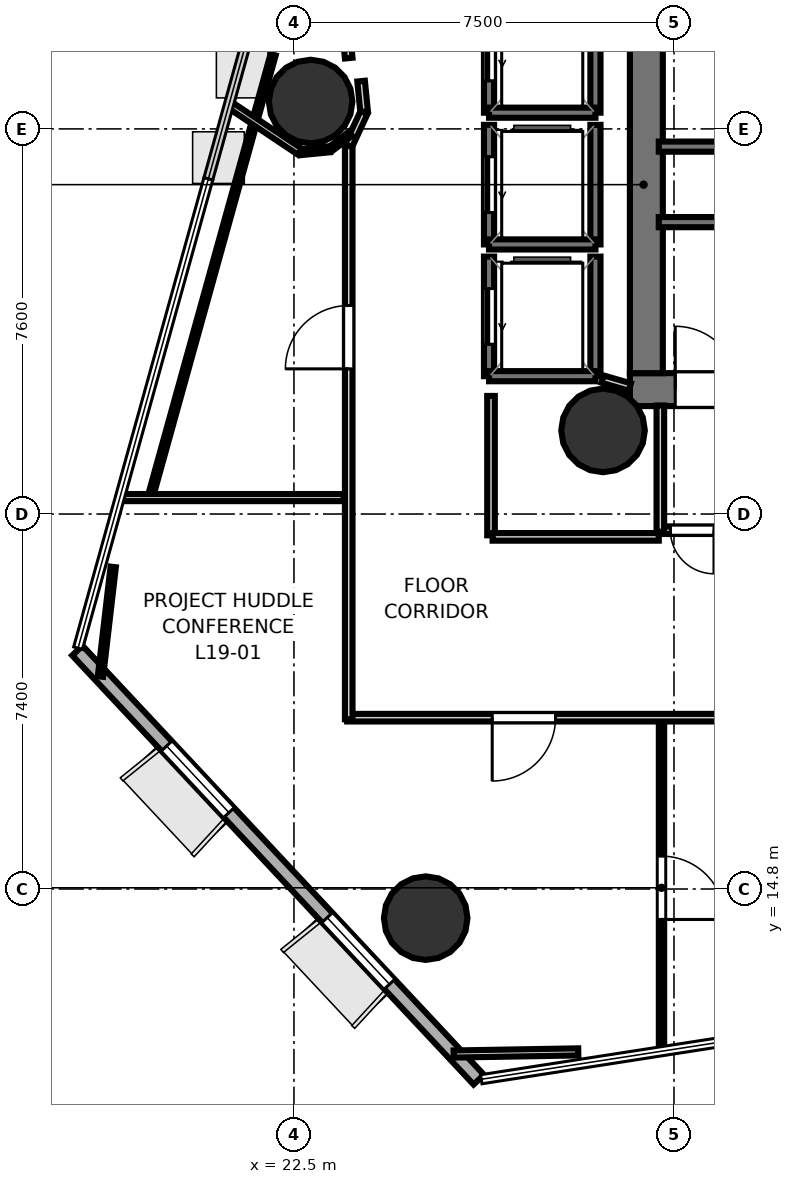
"""IFC4 building model, lengths in metres.
Left out: names, types, materials, properties, quantities, classifications, styles, units other than length and angle.
Written with IfcOpenShell. Run it as: python <this file> out.ifc"""

import sys

from ifc_helpers import new_model, si_unit, direction, frame, frame_2d, origin, origin_2d, place, context, subcontext, project, spatial, rectangle, hollow_circle, extrude, element, fill, save


model = new_model("IFC4")
c1 = context("Model", 3, precision=1e-05, world=origin(), true_north=direction((0.0, 1.0)))
c2 = subcontext(c1, "Body", "Model", "MODEL_VIEW")
j1 = project(units=[si_unit("LENGTHUNIT", "METRE"), si_unit("PLANEANGLEUNIT", "RADIAN")], contexts=[c1])
p1 = place(None, origin())
s1 = spatial("IfcSite", under=j1, at=p1, CompositionType="ELEMENT")
p2 = place(p1, origin())
s2 = spatial("IfcBuilding", under=s1, at=p2, CompositionType="ELEMENT")
p3 = place(p2, frame((0.0, 0.0, 78.4)))
s3 = spatial("IfcBuildingStorey", under=s2, at=p3, CompositionType="ELEMENT", Elevation=78.4)
p4 = place(p3, frame((29.13, 24.655, 0.0), z_axis=(0.0, 0.0, 1.0), x_axis=(1.0, 0.0, 0.0)))
e1 = element("IfcWall", 1, at=p4, inside=s3, PredefinedType="SHEAR", context=c2, shape_type="SweptSolid", body=[
    extrude(rectangle(XDim=10.72, YDim=0.65, at=frame_2d((5.36, 0.0))), origin(), (0.0, 0.0, 1.0), 3.52),
])
p5 = place(p4, frame((0.895, 0.0, 0.0)))
e2 = element("IfcOpeningElement", 2, at=p5, cuts=e1, PredefinedType="OPENING", context=c2, shape_type="SweptSolid", body=[
    extrude(rectangle(XDim=1.25, YDim=2.15, at=frame_2d((0.625, 1.075))), frame((0.0, 0.335, 0.0), z_axis=(0.0, -1.0, 0.0), x_axis=(1.0, 0.0, 0.0)), (0.0, 0.0, 1.0), 0.67),
])
p6 = place(p3, frame((29.455, 24.98, 0.0), z_axis=(0.0, 0.0, 1.0), x_axis=(0.0, 1.0, 0.0)))
e3 = element("IfcWall", 3, at=p6, inside=s3, PredefinedType="SHEAR", context=c2, shape_type="SweptSolid", body=[
    extrude(rectangle(XDim=7.44, YDim=0.65, at=frame_2d((3.72, 0.0))), origin(), (0.0, 0.0, 1.0), 3.52),
])
for number, where, z_axis, x_axis in (
    (4, (28.6, 23.85, 0.0), (0.0, 0.0, 1.0), (1.0, 0.0, 0.0)),
    (5, (22.829, 30.34, 0.0), (0.0, 0.0, 1.0), (1.0, 0.0, 0.0)),
    (6, (25.1, 14.225, 0.0), (0.0, 0.0, 1.0), (1.0, 0.0, 0.0)),
):
    element("IfcColumn", number, at=place(p3, frame(where, z_axis=z_axis, x_axis=x_axis)), inside=s3, PredefinedType="COLUMN", context=c2, shape_type="SweptSolid", body=[
        extrude(hollow_circle(Radius=0.825, WallThickness=0.04, at=origin_2d()), origin(), (0.0, 0.0, 1.0), 3.7),
    ])
p7 = place(p3, frame((18.226, 19.505, 0.0), z_axis=(0.0, 0.0, 1.0), x_axis=(0.683186467085, -0.730243966898, 0.0)))
e7 = element("IfcWall", 7, at=p7, inside=s3, PredefinedType="SOLIDWALL", context=c2, shape_type="SweptSolid", body=[
    extrude(rectangle(XDim=11.595, YDim=0.28, at=frame_2d((5.798, 0.0))), origin(), (0.0, 0.0, 1.0), 3.52),
])
p8 = place(p7, frame((2.579, 0.0, 0.85)))
e8 = element("IfcOpeningElement", 8, at=p8, cuts=e7, PredefinedType="OPENING", context=c2, shape_type="SweptSolid", body=[
    extrude(rectangle(XDim=1.8, YDim=2.1, at=frame_2d((0.9, 1.05))), frame((0.0, 0.15, 0.0), z_axis=(0.0, -1.0, 0.0), x_axis=(1.0, 0.0, 0.0)), (0.0, 0.0, 1.0), 0.3),
])
p9 = place(p7, frame((7.217, 0.0, 0.85)))
e9 = element("IfcOpeningElement", 9, at=p9, cuts=e7, PredefinedType="OPENING", context=c2, shape_type="SweptSolid", body=[
    extrude(rectangle(XDim=1.8, YDim=2.1, at=frame_2d((0.9, 1.05))), frame((0.0, 0.15, 0.0), z_axis=(0.0, -1.0, 0.0), x_axis=(1.0, 0.0, 0.0)), (0.0, 0.0, 1.0), 0.3),
])
p10 = place(p3, frame((29.7, 29.45, 0.0), z_axis=(0.0, 0.0, 1.0), x_axis=(1.0, 0.0, 0.0)))
e10 = element("IfcWall", 10, at=p10, inside=s3, PredefinedType="SOLIDWALL", context=c2, shape_type="SweptSolid", body=[
    extrude(rectangle(XDim=8.3, YDim=0.2, at=frame_2d((4.15, 0.0))), origin(), (0.0, 0.0, 1.0), 3.52),
])
p11 = place(p3, frame((29.7, 27.96, 0.0), z_axis=(0.0, 0.0, 1.0), x_axis=(1.0, 0.0, 0.0)))
e11 = element("IfcWall", 11, at=p11, inside=s3, PredefinedType="SOLIDWALL", context=c2, shape_type="SweptSolid", body=[
    extrude(rectangle(XDim=7.75, YDim=0.2, at=frame_2d((3.875, 0.0))), origin(), (0.0, 0.0, 1.0), 3.52),
])
p12 = place(p3, frame((28.45, 30.12, 0.0), z_axis=(0.0, 0.0, 1.0), x_axis=(0.0, 1.0, 0.0)))
e12 = element("IfcWall", 12, at=p12, inside=s3, PredefinedType="SOLIDWALL", context=c2, shape_type="SweptSolid", body=[
    extrude(rectangle(XDim=2.36, YDim=0.2, at=frame_2d((1.18, 0.0))), origin(), (0.0, 0.0, 1.0), 3.52),
])
p13 = place(p3, frame((26.35, 30.12, 0.0), z_axis=(0.0, 0.0, 1.0), x_axis=(0.0, 1.0, 0.0)))
e13 = element("IfcWall", 13, at=p13, inside=s3, PredefinedType="SOLIDWALL", context=c2, shape_type="SweptSolid", body=[
    extrude(rectangle(XDim=2.36, YDim=0.2, at=frame_2d((1.18, 0.0))), origin(), (0.0, 0.0, 1.0), 3.52),
])
p14 = place(p13, frame((0.63, 0.0, 0.0)))
e14 = element("IfcOpeningElement", 14, at=p14, cuts=e13, PredefinedType="OPENING", context=c2, shape_type="SweptSolid", body=[
    extrude(rectangle(XDim=1.1, YDim=2.15, at=frame_2d((0.55, 1.075))), frame((0.0, 0.11, 0.0), z_axis=(0.0, -1.0, 0.0), x_axis=(1.0, 0.0, 0.0)), (0.0, 0.0, 1.0), 0.22),
])
p15 = place(p3, frame((26.35, 30.12, 0.0), z_axis=(0.0, 0.0, 1.0), x_axis=(1.0, 0.0, 0.0)))
e15 = element("IfcWall", 15, at=p15, inside=s3, PredefinedType="SOLIDWALL", context=c2, shape_type="SweptSolid", body=[
    extrude(rectangle(XDim=2.1, YDim=0.2, at=frame_2d((1.05, 0.0))), origin(), (0.0, 0.0, 1.0), 3.52),
])
p16 = place(p3, frame((28.45, 27.52, 0.0), z_axis=(0.0, 0.0, 1.0), x_axis=(0.0, 1.0, 0.0)))
e16 = element("IfcWall", 16, at=p16, inside=s3, PredefinedType="SOLIDWALL", context=c2, shape_type="SweptSolid", body=[
    extrude(rectangle(XDim=2.36, YDim=0.2, at=frame_2d((1.18, 0.0))), origin(), (0.0, 0.0, 1.0), 3.52),
])
p17 = place(p3, frame((26.35, 27.52, 0.0), z_axis=(0.0, 0.0, 1.0), x_axis=(0.0, 1.0, 0.0)))
e17 = element("IfcWall", 17, at=p17, inside=s3, PredefinedType="SOLIDWALL", context=c2, shape_type="SweptSolid", body=[
    extrude(rectangle(XDim=2.36, YDim=0.2, at=frame_2d((1.18, 0.0))), origin(), (0.0, 0.0, 1.0), 3.52),
])
p18 = place(p17, frame((0.63, 0.0, 0.0)))
e18 = element("IfcOpeningElement", 18, at=p18, cuts=e17, PredefinedType="OPENING", context=c2, shape_type="SweptSolid", body=[
    extrude(rectangle(XDim=1.1, YDim=2.15, at=frame_2d((0.55, 1.075))), frame((0.0, 0.11, 0.0), z_axis=(0.0, -1.0, 0.0), x_axis=(1.0, 0.0, 0.0)), (0.0, 0.0, 1.0), 0.22),
])
p19 = place(p3, frame((26.35, 27.52, 0.0), z_axis=(0.0, 0.0, 1.0), x_axis=(1.0, 0.0, 0.0)))
e19 = element("IfcWall", 19, at=p19, inside=s3, PredefinedType="SOLIDWALL", context=c2, shape_type="SweptSolid", body=[
    extrude(rectangle(XDim=2.1, YDim=0.2, at=frame_2d((1.05, 0.0))), origin(), (0.0, 0.0, 1.0), 3.52),
])
p20 = place(p3, frame((28.45, 24.92, 0.0), z_axis=(0.0, 0.0, 1.0), x_axis=(0.0, 1.0, 0.0)))
e20 = element("IfcWall", 20, at=p20, inside=s3, PredefinedType="SOLIDWALL", context=c2, shape_type="SweptSolid", body=[
    extrude(rectangle(XDim=2.36, YDim=0.2, at=frame_2d((1.18, 0.0))), origin(), (0.0, 0.0, 1.0), 3.52),
])
p21 = place(p3, frame((26.35, 24.92, 0.0), z_axis=(0.0, 0.0, 1.0), x_axis=(0.0, 1.0, 0.0)))
e21 = element("IfcWall", 21, at=p21, inside=s3, PredefinedType="SOLIDWALL", context=c2, shape_type="SweptSolid", body=[
    extrude(rectangle(XDim=2.36, YDim=0.2, at=frame_2d((1.18, 0.0))), origin(), (0.0, 0.0, 1.0), 3.52),
])
p22 = place(p21, frame((0.63, 0.0, 0.0)))
e22 = element("IfcOpeningElement", 22, at=p22, cuts=e21, PredefinedType="OPENING", context=c2, shape_type="SweptSolid", body=[
    extrude(rectangle(XDim=1.1, YDim=2.15, at=frame_2d((0.55, 1.075))), frame((0.0, 0.11, 0.0), z_axis=(0.0, -1.0, 0.0), x_axis=(1.0, 0.0, 0.0)), (0.0, 0.0, 1.0), 0.22),
])
p23 = place(p3, frame((26.35, 24.92, 0.0), z_axis=(0.0, 0.0, 1.0), x_axis=(1.0, 0.0, 0.0)))
e23 = element("IfcWall", 23, at=p23, inside=s3, PredefinedType="SOLIDWALL", context=c2, shape_type="SweptSolid", body=[
    extrude(rectangle(XDim=2.1, YDim=0.2, at=frame_2d((1.05, 0.0))), origin(), (0.0, 0.0, 1.0), 3.52),
])
p24 = place(p3, frame((33.45, 21.881, 0.0), z_axis=(0.0, 0.0, 1.0), x_axis=(-1.0, 0.0, 0.0)))
e24 = element("IfcWall", 24, at=p24, inside=s3, PredefinedType="PARTITIONING", context=c2, shape_type="SweptSolid", body=[
    extrude(rectangle(XDim=3.75, YDim=0.15, at=frame_2d((1.875, 0.0))), origin(), (0.0, 0.0, 1.0), 2.84),
])
p25 = place(p24, frame((1.275, 0.0, 0.0)))
e25 = element("IfcOpeningElement", 25, at=p25, cuts=e24, PredefinedType="OPENING", context=c2, shape_type="SweptSolid", body=[
    extrude(rectangle(XDim=1.2, YDim=2.15, at=frame_2d((0.6, 1.075))), frame((0.0, 0.085, 0.0), z_axis=(0.0, -1.0, 0.0), x_axis=(1.0, 0.0, 0.0)), (0.0, 0.0, 1.0), 0.17),
])
p26 = place(p24, frame((2.66, 0.0, 0.0)))
e26 = element("IfcOpeningElement", 26, at=p26, cuts=e24, PredefinedType="OPENING", context=c2, shape_type="SweptSolid", body=[
    extrude(rectangle(XDim=0.86, YDim=2.05, at=frame_2d((0.43, 1.025))), frame((0.0, 0.085, 0.0), z_axis=(0.0, -1.0, 0.0), x_axis=(1.0, 0.0, 0.0)), (0.0, 0.0, 1.0), 0.17),
])
p27 = place(p3, frame((29.731, 21.85, 0.0), z_axis=(0.0, 0.0, 1.0), x_axis=(0.0, 1.0, 0.0)))
e27 = element("IfcWall", 27, at=p27, inside=s3, PredefinedType="PARTITIONING", context=c2, shape_type="SweptSolid", body=[
    extrude(rectangle(XDim=2.492, YDim=0.15, at=frame_2d((1.246, 0.0))), origin(), (0.0, 0.0, 1.0), 2.84),
])
p28 = place(p3, frame((29.13, 24.706, 0.0), z_axis=(0.0, 0.0, 1.0), x_axis=(-0.960451214223, 0.278448316742, 0.0)))
e28 = element("IfcWall", 28, at=p28, inside=s3, PredefinedType="PARTITIONING", context=c2, shape_type="SweptSolid", body=[
    extrude(rectangle(XDim=0.562, YDim=0.15, at=frame_2d((0.281, 0.0))), origin(), (0.0, 0.0, 1.0), 2.84),
])
p29 = place(p3, frame((23.581, 31.197, 0.0), z_axis=(0.0, 0.0, 1.0), x_axis=(-0.098472401476, 0.995139782215, 0.0)))
e29 = element("IfcWall", 29, at=p29, inside=s3, PredefinedType="PARTITIONING", context=c2, shape_type="SweptSolid", body=[
    extrude(rectangle(XDim=5.625, YDim=0.15, at=frame_2d((2.813, 0.0))), origin(), (0.0, 0.0, 1.0), 2.798),
])
p30 = place(p3, frame((26.389, 24.531, 0.0), z_axis=(0.0, 0.0, 1.0), x_axis=(0.0, -1.0, 0.0)))
e30 = element("IfcWall", 30, at=p30, inside=s3, PredefinedType="PARTITIONING", context=c2, shape_type="SweptSolid", body=[
    extrude(rectangle(XDim=2.75, YDim=0.15, at=frame_2d((1.375, 0.0))), origin(), (0.0, 0.0, 1.0), 2.84),
])
p31 = place(p3, frame((26.42, 21.749, 0.0), z_axis=(0.0, 0.0, 1.0), x_axis=(1.0, 0.0, 0.0)))
e31 = element("IfcWall", 31, at=p31, inside=s3, PredefinedType="PARTITIONING", context=c2, shape_type="SweptSolid", body=[
    extrude(rectangle(XDim=3.28, YDim=0.15, at=frame_2d((1.64, 0.0))), origin(), (0.0, 0.0, 1.0), 2.84),
])
p32 = place(p3, frame((33.32, 18.181, 0.0), z_axis=(0.0, 0.0, 1.0), x_axis=(-1.0, 0.0, 0.0)))
e32 = element("IfcWall", 32, at=p32, inside=s3, PredefinedType="PARTITIONING", context=c2, shape_type="SweptSolid", body=[
    extrude(rectangle(XDim=9.77, YDim=0.15, at=frame_2d((4.885, 0.0))), origin(), (0.0, 0.0, 1.0), 2.798),
])
p33 = place(p32, frame((5.657, 0.0, 0.0)))
e33 = element("IfcOpeningElement", 33, at=p33, cuts=e32, PredefinedType="OPENING", context=c2, shape_type="SweptSolid", body=[
    extrude(rectangle(XDim=1.25, YDim=2.2, at=frame_2d((0.625, 1.1))), frame((0.0, 0.085, 0.0), z_axis=(0.0, -1.0, 0.0), x_axis=(1.0, 0.0, 0.0)), (0.0, 0.0, 1.0), 0.17),
])
p34 = place(p3, frame((23.581, 18.15, 0.0), z_axis=(0.0, 0.0, 1.0), x_axis=(0.0, 1.0, 0.0)))
e34 = element("IfcWall", 34, at=p34, inside=s3, PredefinedType="PARTITIONING", context=c2, shape_type="SweptSolid", body=[
    extrude(rectangle(XDim=11.333, YDim=0.15, at=frame_2d((5.667, 0.0))), origin(), (0.0, 0.0, 1.0), 2.798),
])
p35 = place(p34, frame((6.915, 0.0, 0.0)))
e35 = element("IfcOpeningElement", 35, at=p35, cuts=e34, PredefinedType="OPENING", context=c2, shape_type="SweptSolid", body=[
    extrude(rectangle(XDim=1.25, YDim=2.2, at=frame_2d((0.625, 1.1))), frame((0.0, 0.085, 0.0), z_axis=(0.0, -1.0, 0.0), x_axis=(1.0, 0.0, 0.0)), (0.0, 0.0, 1.0), 0.17),
])
p36 = place(p3, frame((23.578, 29.47, 0.0), z_axis=(0.0, 0.0, 1.0), x_axis=(0.421827918194, 0.906675910914, 0.0)))
e36 = element("IfcWall", 36, at=p36, inside=s3, PredefinedType="PARTITIONING", context=c2, shape_type="SweptSolid", body=[
    extrude(rectangle(XDim=0.72, YDim=0.15, at=frame_2d((0.36, 0.0))), origin(), (0.0, 0.0, 1.0), 2.84),
])
p37 = place(p3, frame((23.885, 30.139, 0.0), z_axis=(0.0, 0.0, 1.0), x_axis=(-0.0981888168, 0.995167803064, 0.0)))
e37 = element("IfcWall", 37, at=p37, inside=s3, PredefinedType="PARTITIONING", context=c2, shape_type="SweptSolid", body=[
    extrude(rectangle(XDim=0.607, YDim=0.15, at=frame_2d((0.303, 0.0))), origin(), (0.0, 0.0, 1.0), 2.84),
])
p38 = place(p3, frame((29.754, 18.07, 0.0), z_axis=(0.0, 0.0, 1.0), x_axis=(0.0, -1.0, 0.0)))
e38 = element("IfcWall", 38, at=p38, inside=s3, PredefinedType="PARTITIONING", context=c2, shape_type="SweptSolid", body=[
    extrude(rectangle(XDim=6.492, YDim=0.105, at=frame_2d((3.246, 0.0))), origin(), (0.0, 0.0, 1.0), 2.798),
])
p39 = place(p38, frame((2.621, 0.0, 0.0)))
e39 = element("IfcOpeningElement", 39, at=p39, cuts=e38, PredefinedType="OPENING", context=c2, shape_type="SweptSolid", body=[
    extrude(rectangle(XDim=1.25, YDim=2.2, at=frame_2d((0.625, 1.1))), frame((0.0, 0.062, 0.0), z_axis=(0.0, -1.0, 0.0), x_axis=(1.0, 0.0, 0.0)), (0.0, 0.0, 1.0), 0.125),
])
p40 = place(p3, frame((28.111, 11.586, 0.0), z_axis=(0.0, 0.0, 1.0), x_axis=(-0.999852578009, -0.017170388723, 0.0)))
e40 = element("IfcWall", 40, at=p40, inside=s3, PredefinedType="PARTITIONING", context=c2, shape_type="SweptSolid", body=[
    extrude(rectangle(XDim=2.46, YDim=0.14, at=frame_2d((1.23, 0.0))), origin(), (0.0, 0.0, 1.0), 2.84),
])
p41 = place(p3, frame((18.681, 18.993, 0.0), z_axis=(0.0, 0.0, 1.0), x_axis=(0.115709243411, 0.993283127305, 0.0)))
e41 = element("IfcWall", 41, at=p41, inside=s3, PredefinedType="PARTITIONING", context=c2, shape_type="SweptSolid", body=[
    extrude(rectangle(XDim=2.177, YDim=0.105, at=frame_2d((1.089, 0.0))), origin(), (0.0, 0.0, 1.0), 2.84),
])
p42 = place(p3, frame((19.044, 22.524, 0.0), z_axis=(0.0, 0.0, 1.0), x_axis=(1.0, 0.0, 0.0)))
e42 = element("IfcWall", 42, at=p42, inside=s3, PredefinedType="PARTITIONING", context=c2, shape_type="SweptSolid", body=[
    extrude(rectangle(XDim=4.437, YDim=0.14, at=frame_2d((2.219, 0.0))), origin(), (0.0, 0.0, 1.0), 2.84),
])
p43 = place(p3, frame((19.691, 22.631, 0.0), z_axis=(0.0, 0.0, 1.0), x_axis=(0.267580621622, 0.963535474662, 0.0)))
e43 = element("IfcWall", 43, at=p43, inside=s3, PredefinedType="PARTITIONING", context=c2, shape_type="SweptSolid", body=[
    extrude(rectangle(XDim=8.96, YDim=0.105, at=frame_2d((4.48, 0.0))), origin(), (0.0, 0.0, 1.0), 2.798),
])
p44 = place(p3, frame((21.202, 30.295, 0.0), z_axis=(0.0, 0.0, 1.0), x_axis=(0.831454856981, -0.555592315285, 0.0)))
e44 = element("IfcWall", 44, at=p44, inside=s3, PredefinedType="PARTITIONING", context=c2, shape_type="SweptSolid", body=[
    extrude(rectangle(XDim=1.705, YDim=0.14, at=frame_2d((0.852, 0.0))), origin(), (0.0, 0.0, 1.0), 2.798),
])
p45 = place(p3, frame((22.64, 29.343, 0.0), z_axis=(0.0, 0.0, 1.0), x_axis=(0.995167364461, 0.098193262045, 0.0)))
e45 = element("IfcWall", 45, at=p45, inside=s3, PredefinedType="PARTITIONING", context=c2, shape_type="SweptSolid", body=[
    extrude(rectangle(XDim=0.572, YDim=0.12, at=frame_2d((0.286, 0.0))), origin(), (0.0, 0.0, 1.0), 2.798),
])
p46 = place(p3, frame((23.225, 29.406, 0.0), z_axis=(0.0, 0.0, 1.0), x_axis=(0.792697562137, 0.609615103965, 0.0)))
e46 = element("IfcWall", 46, at=p46, inside=s3, PredefinedType="PARTITIONING", context=c2, shape_type="SweptSolid", body=[
    extrude(rectangle(XDim=0.493, YDim=0.105, at=frame_2d((0.247, 0.0))), origin(), (0.0, 0.0, 1.0), 2.84),
])
p47 = place(p5, origin())
e47 = element("IfcDoor", 47, at=p47, inside=s3, OperationType="SINGLE_SWING_LEFT", PredefinedType="DOOR", context=c2, shape_type="SweptSolid", body=[
    extrude(rectangle(XDim=1.25, YDim=2.15, at=frame_2d((0.625, 1.075))), frame((0.0, 0.025, 0.0), z_axis=(0.0, -1.0, 0.0), x_axis=(1.0, 0.0, 0.0)), (0.0, 0.0, 1.0), 0.05),
])
fill(e2, e47)
p48 = place(p14, origin())
e48 = element("IfcDoor", 48, at=p48, inside=s3, OperationType="SLIDING_TO_LEFT", PredefinedType="DOOR", context=c2, shape_type="SweptSolid", body=[
    extrude(rectangle(XDim=1.1, YDim=2.15, at=frame_2d((0.55, 1.075))), frame((0.0, 0.025, 0.0), z_axis=(0.0, -1.0, 0.0), x_axis=(1.0, 0.0, 0.0)), (0.0, 0.0, 1.0), 0.05),
])
fill(e14, e48)
p49 = place(p18, origin())
e49 = element("IfcDoor", 49, at=p49, inside=s3, OperationType="SLIDING_TO_LEFT", PredefinedType="DOOR", context=c2, shape_type="SweptSolid", body=[
    extrude(rectangle(XDim=1.1, YDim=2.15, at=frame_2d((0.55, 1.075))), frame((0.0, 0.025, 0.0), z_axis=(0.0, -1.0, 0.0), x_axis=(1.0, 0.0, 0.0)), (0.0, 0.0, 1.0), 0.05),
])
fill(e18, e49)
p50 = place(p22, origin())
e50 = element("IfcDoor", 50, at=p50, inside=s3, OperationType="SLIDING_TO_LEFT", PredefinedType="DOOR", context=c2, shape_type="SweptSolid", body=[
    extrude(rectangle(XDim=1.1, YDim=2.15, at=frame_2d((0.55, 1.075))), frame((0.0, 0.025, 0.0), z_axis=(0.0, -1.0, 0.0), x_axis=(1.0, 0.0, 0.0)), (0.0, 0.0, 1.0), 0.05),
])
fill(e22, e50)
p51 = place(p26, origin())
e51 = element("IfcDoor", 51, at=p51, inside=s3, OperationType="SINGLE_SWING_LEFT", PredefinedType="DOOR", context=c2, shape_type="SweptSolid", body=[
    extrude(rectangle(XDim=0.86, YDim=2.05, at=frame_2d((0.43, 1.025))), frame((0.0, 0.025, 0.0), z_axis=(0.0, -1.0, 0.0), x_axis=(1.0, 0.0, 0.0)), (0.0, 0.0, 1.0), 0.05),
])
fill(e26, e51)
p52 = place(p33, origin())
e52 = element("IfcDoor", 52, at=p52, inside=s3, OperationType="SINGLE_SWING_RIGHT", PredefinedType="DOOR", context=c2, shape_type="SweptSolid", body=[
    extrude(rectangle(XDim=1.25, YDim=2.2, at=frame_2d((0.625, 1.1))), frame((0.0, 0.025, 0.0), z_axis=(0.0, -1.0, 0.0), x_axis=(1.0, 0.0, 0.0)), (0.0, 0.0, 1.0), 0.05),
])
fill(e33, e52)
p53 = place(p35, origin())
e53 = element("IfcDoor", 53, at=p53, inside=s3, OperationType="SINGLE_SWING_LEFT", PredefinedType="DOOR", context=c2, shape_type="SweptSolid", body=[
    extrude(rectangle(XDim=1.25, YDim=2.2, at=frame_2d((0.625, 1.1))), frame((0.0, 0.025, 0.0), z_axis=(0.0, -1.0, 0.0), x_axis=(1.0, 0.0, 0.0)), (0.0, 0.0, 1.0), 0.05),
])
fill(e35, e53)
p54 = place(p39, origin())
e54 = element("IfcDoor", 54, at=p54, inside=s3, OperationType="SINGLE_SWING_RIGHT", PredefinedType="DOOR", context=c2, shape_type="SweptSolid", body=[
    extrude(rectangle(XDim=1.25, YDim=2.2, at=frame_2d((0.625, 1.1))), frame((0.0, 0.025, 0.0), z_axis=(0.0, -1.0, 0.0), x_axis=(1.0, 0.0, 0.0)), (0.0, 0.0, 1.0), 0.05),
])
fill(e39, e54)
p55 = place(p8, origin())
e55 = element("IfcWindow", 55, at=p55, inside=s3, PartitioningType="SINGLE_PANEL", PredefinedType="WINDOW", context=c2, shape_type="SweptSolid", body=[
    extrude(rectangle(XDim=1.8, YDim=2.1, at=frame_2d((0.9, 1.05))), frame((0.0, 0.03, 0.0), z_axis=(0.0, -1.0, 0.0), x_axis=(1.0, 0.0, 0.0)), (0.0, 0.0, 1.0), 0.06),
])
fill(e8, e55)
p56 = place(p9, origin())
e56 = element("IfcWindow", 56, at=p56, inside=s3, PartitioningType="SINGLE_PANEL", PredefinedType="WINDOW", context=c2, shape_type="SweptSolid", body=[
    extrude(rectangle(XDim=1.8, YDim=2.1, at=frame_2d((0.9, 1.05))), frame((0.0, 0.03, 0.0), z_axis=(0.0, -1.0, 0.0), x_axis=(1.0, 0.0, 0.0)), (0.0, 0.0, 1.0), 0.06),
])
fill(e9, e56)
save(model, sys.argv[1])
